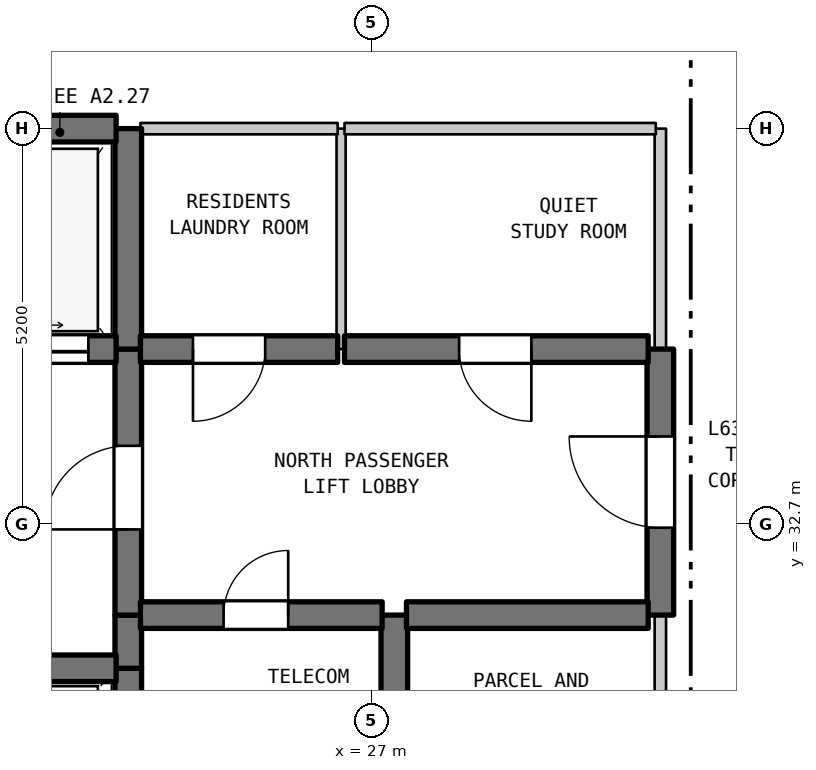
"""IFC4 building model, lengths in metres.
Left out: names, types, materials, properties, quantities, classifications, styles, units other than length and angle.
Written with IfcOpenShell. Run it as: python <this file> out.ifc"""

import sys

from ifc_helpers import new_model, si_unit, direction, frame, frame_2d, origin, place, context, subcontext, project, spatial, rectangle, extrude, element, fill, save


model = new_model("IFC4")
c1 = context("Model", 3, precision=1e-05, world=origin(), true_north=direction((0.0, 1.0)))
c2 = subcontext(c1, "Body", "Model", "MODEL_VIEW")
j1 = project(units=[si_unit("LENGTHUNIT", "METRE"), si_unit("PLANEANGLEUNIT", "RADIAN")], contexts=[c1])
p1 = place(None, origin())
s1 = spatial("IfcSite", under=j1, at=p1, CompositionType="ELEMENT")
p2 = place(p1, origin())
s2 = spatial("IfcBuilding", under=s1, at=p2, CompositionType="ELEMENT")
p3 = place(p2, frame((0.0, 0.0, 254.7)))
s3 = spatial("IfcBuildingStorey", under=s2, at=p3, CompositionType="ELEMENT", Elevation=254.7)
p4 = place(p3, frame((23.8, 28.2, 0.0), z_axis=(0.0, 0.0, 1.0), x_axis=(0.0, 1.0, 0.0)))
e1 = element("IfcWall", 1, at=p4, inside=s3, PredefinedType="SHEAR", context=c2, shape_type="SweptSolid", body=[
    extrude(rectangle(XDim=2.6, YDim=0.35, at=frame_2d((1.3, 0.0))), origin(), (0.0, 0.0, 1.0), 3.39),
])
p5 = place(p3, frame((23.8, 30.8, 0.0), z_axis=(0.0, 0.0, 1.0), x_axis=(0.0, 1.0, 0.0)))
e2 = element("IfcWall", 2, at=p5, inside=s3, PredefinedType="SHEAR", context=c2, shape_type="SweptSolid", body=[
    extrude(rectangle(XDim=0.7, YDim=0.35, at=frame_2d((0.35, 0.0))), origin(), (0.0, 0.0, 1.0), 3.39),
])
p6 = place(p3, frame((23.8, 31.5, 0.0), z_axis=(0.0, 0.0, 1.0), x_axis=(0.0, 1.0, 0.0)))
e3 = element("IfcWall", 3, at=p6, inside=s3, PredefinedType="SHEAR", context=c2, shape_type="SweptSolid", body=[
    extrude(rectangle(XDim=3.5, YDim=0.35, at=frame_2d((1.75, 0.0))), origin(), (0.0, 0.0, 1.0), 3.39),
])
p7 = place(p6, frame((1.127, 0.0, 0.0)))
e4 = element("IfcOpeningElement", 4, at=p7, cuts=e3, PredefinedType="OPENING", context=c2, shape_type="SweptSolid", body=[
    extrude(rectangle(XDim=1.1, YDim=2.15, at=frame_2d((0.55, 1.075))), frame((0.0, 0.185, 0.0), z_axis=(0.0, -1.0, 0.0), x_axis=(1.0, 0.0, 0.0)), (0.0, 0.0, 1.0), 0.37),
])
p8 = place(p3, frame((23.8, 35.0, 0.0), z_axis=(0.0, 0.0, 1.0), x_axis=(0.0, 1.0, 0.0)))
e5 = element("IfcWall", 5, at=p8, inside=s3, PredefinedType="SHEAR", context=c2, shape_type="SweptSolid", body=[
    extrude(rectangle(XDim=2.9, YDim=0.35, at=frame_2d((1.45, 0.0))), origin(), (0.0, 0.0, 1.0), 3.39),
])
p9 = place(p3, frame((26.6, 35.0, 0.0), z_axis=(0.0, 0.0, 1.0), x_axis=(0.0, 1.0, 0.0)))
e6 = element("IfcWall", 6, at=p9, inside=s3, PredefinedType="PARTITIONING", context=c2, shape_type="SweptSolid", body=[
    extrude(rectangle(XDim=2.9, YDim=0.12, at=frame_2d((1.45, 0.0))), origin(), (0.0, 0.0, 1.0), 3.39),
])
p10 = place(p3, frame((27.3, 28.9, 0.0), z_axis=(0.0, 0.0, 1.0), x_axis=(0.0, 1.0, 0.0)))
e7 = element("IfcWall", 7, at=p10, inside=s3, PredefinedType="SHEAR", context=c2, shape_type="SweptSolid", body=[
    extrude(rectangle(XDim=2.6, YDim=0.35, at=frame_2d((1.3, 0.0))), origin(), (0.0, 0.0, 1.0), 3.39),
])
p11 = place(p3, frame((30.8, 28.9, 0.0), z_axis=(0.0, 0.0, 1.0), x_axis=(0.0, 1.0, 0.0)))
e8 = element("IfcWall", 8, at=p11, inside=s3, PredefinedType="STANDARD", context=c2, shape_type="SweptSolid", body=[
    extrude(rectangle(XDim=2.6, YDim=0.15, at=frame_2d((1.3, 0.0))), origin(), (0.0, 0.0, 1.0), 3.39),
])
p12 = place(p3, frame((30.8, 31.5, 0.0), z_axis=(0.0, 0.0, 1.0), x_axis=(0.0, 1.0, 0.0)))
e9 = element("IfcWall", 9, at=p12, inside=s3, PredefinedType="SHEAR", context=c2, shape_type="SweptSolid", body=[
    extrude(rectangle(XDim=3.5, YDim=0.35, at=frame_2d((1.75, 0.0))), origin(), (0.0, 0.0, 1.0), 3.39),
])
p13 = place(p12, frame((1.15, 0.0, 0.0)))
e10 = element("IfcOpeningElement", 10, at=p13, cuts=e9, PredefinedType="OPENING", context=c2, shape_type="SweptSolid", body=[
    extrude(rectangle(XDim=1.2, YDim=2.2, at=frame_2d((0.6, 1.1))), frame((0.0, 0.185, 0.0), z_axis=(0.0, -1.0, 0.0), x_axis=(1.0, 0.0, 0.0)), (0.0, 0.0, 1.0), 0.37),
])
p14 = place(p3, frame((30.8, 35.0, 0.0), z_axis=(0.0, 0.0, 1.0), x_axis=(0.0, 1.0, 0.0)))
e11 = element("IfcWall", 11, at=p14, inside=s3, PredefinedType="STANDARD", context=c2, shape_type="SweptSolid", body=[
    extrude(rectangle(XDim=2.9, YDim=0.15, at=frame_2d((1.45, 0.0))), origin(), (0.0, 0.0, 1.0), 3.39),
])
p15 = place(p3, frame((19.16, 30.8, 0.0), z_axis=(0.0, 0.0, 1.0), x_axis=(1.0, 0.0, 0.0)))
e12 = element("IfcWall", 12, at=p15, inside=s3, PredefinedType="SHEAR", context=c2, shape_type="SweptSolid", body=[
    extrude(rectangle(XDim=4.48, YDim=0.35, at=frame_2d((2.24, 0.0))), origin(), (0.0, 0.0, 1.0), 3.39),
])
p16 = place(p3, frame((23.96, 31.5, 0.0), z_axis=(0.0, 0.0, 1.0), x_axis=(1.0, 0.0, 0.0)))
e13 = element("IfcWall", 13, at=p16, inside=s3, PredefinedType="SHEAR", context=c2, shape_type="SweptSolid", body=[
    extrude(rectangle(XDim=3.18, YDim=0.35, at=frame_2d((1.59, 0.0))), origin(), (0.0, 0.0, 1.0), 3.39),
])
p17 = place(p16, frame((1.094, 0.0, 0.0)))
e14 = element("IfcOpeningElement", 14, at=p17, cuts=e13, PredefinedType="OPENING", context=c2, shape_type="SweptSolid", body=[
    extrude(rectangle(XDim=0.85, YDim=2.1, at=frame_2d((0.425, 1.05))), frame((0.0, 0.185, 0.0), z_axis=(0.0, -1.0, 0.0), x_axis=(1.0, 0.0, 0.0)), (0.0, 0.0, 1.0), 0.37),
])
p18 = place(p3, frame((27.46, 31.5, 0.0), z_axis=(0.0, 0.0, 1.0), x_axis=(1.0, 0.0, 0.0)))
e15 = element("IfcWall", 15, at=p18, inside=s3, PredefinedType="SHEAR", context=c2, shape_type="SweptSolid", body=[
    extrude(rectangle(XDim=3.18, YDim=0.35, at=frame_2d((1.59, 0.0))), origin(), (0.0, 0.0, 1.0), 3.39),
])
p19 = place(p3, frame((19.16, 35.0, 0.0), z_axis=(0.0, 0.0, 1.0), x_axis=(1.0, 0.0, 0.0)))
e16 = element("IfcWall", 16, at=p19, inside=s3, PredefinedType="SHEAR", context=c2, shape_type="SweptSolid", body=[
    extrude(rectangle(XDim=4.48, YDim=0.35, at=frame_2d((2.24, 0.0))), origin(), (0.0, 0.0, 1.0), 3.39),
])
p20 = place(p19, frame((0.365, 0.0, 0.0)))
e17 = element("IfcOpeningElement", 17, at=p20, cuts=e16, PredefinedType="OPENING", context=c2, shape_type="SweptSolid", body=[
    extrude(rectangle(XDim=1.35, YDim=2.2, at=frame_2d((0.675, 1.1))), frame((0.0, 0.185, 0.0), z_axis=(0.0, -1.0, 0.0), x_axis=(1.0, 0.0, 0.0)), (0.0, 0.0, 1.0), 0.37),
])
p21 = place(p19, frame((2.765, 0.0, 0.0)))
e18 = element("IfcOpeningElement", 18, at=p21, cuts=e16, PredefinedType="OPENING", context=c2, shape_type="SweptSolid", body=[
    extrude(rectangle(XDim=1.35, YDim=2.2, at=frame_2d((0.675, 1.1))), frame((0.0, 0.185, 0.0), z_axis=(0.0, -1.0, 0.0), x_axis=(1.0, 0.0, 0.0)), (0.0, 0.0, 1.0), 0.37),
])
p22 = place(p3, frame((23.96, 35.0, 0.0), z_axis=(0.0, 0.0, 1.0), x_axis=(1.0, 0.0, 0.0)))
e19 = element("IfcWall", 19, at=p22, inside=s3, PredefinedType="SHEAR", context=c2, shape_type="SweptSolid", body=[
    extrude(rectangle(XDim=2.595, YDim=0.35, at=frame_2d((1.297, 0.0))), origin(), (0.0, 0.0, 1.0), 3.39),
])
p23 = place(p22, frame((0.691, 0.0, 0.0)))
e20 = element("IfcOpeningElement", 20, at=p23, cuts=e19, PredefinedType="OPENING", context=c2, shape_type="SweptSolid", body=[
    extrude(rectangle(XDim=0.95, YDim=2.15, at=frame_2d((0.475, 1.075))), frame((0.0, 0.185, 0.0), z_axis=(0.0, -1.0, 0.0), x_axis=(1.0, 0.0, 0.0)), (0.0, 0.0, 1.0), 0.37),
])
p24 = place(p3, frame((26.645, 35.0, 0.0), z_axis=(0.0, 0.0, 1.0), x_axis=(1.0, 0.0, 0.0)))
e21 = element("IfcWall", 21, at=p24, inside=s3, PredefinedType="SHEAR", context=c2, shape_type="SweptSolid", body=[
    extrude(rectangle(XDim=3.995, YDim=0.35, at=frame_2d((1.998, 0.0))), origin(), (0.0, 0.0, 1.0), 3.39),
])
p25 = place(p24, frame((1.508, 0.0, 0.0)))
e22 = element("IfcOpeningElement", 22, at=p25, cuts=e21, PredefinedType="OPENING", context=c2, shape_type="SweptSolid", body=[
    extrude(rectangle(XDim=0.95, YDim=2.15, at=frame_2d((0.475, 1.075))), frame((0.0, 0.185, 0.0), z_axis=(0.0, -1.0, 0.0), x_axis=(1.0, 0.0, 0.0)), (0.0, 0.0, 1.0), 0.37),
])
p26 = place(p3, frame((19.16, 37.9, 0.0), z_axis=(0.0, 0.0, 1.0), x_axis=(1.0, 0.0, 0.0)))
e23 = element("IfcWall", 23, at=p26, inside=s3, PredefinedType="SHEAR", context=c2, shape_type="SweptSolid", body=[
    extrude(rectangle(XDim=4.48, YDim=0.35, at=frame_2d((2.24, 0.0))), origin(), (0.0, 0.0, 1.0), 3.39),
])
p27 = place(p3, frame((23.96, 37.9, 0.0), z_axis=(0.0, 0.0, 1.0), x_axis=(1.0, 0.0, 0.0)))
e24 = element("IfcWall", 24, at=p27, inside=s3, PredefinedType="STANDARD", context=c2, shape_type="SweptSolid", body=[
    extrude(rectangle(XDim=2.595, YDim=0.15, at=frame_2d((1.297, 0.0))), origin(), (0.0, 0.0, 1.0), 2.89),
])
p28 = place(p3, frame((26.645, 37.9, 0.0), z_axis=(0.0, 0.0, 1.0), x_axis=(1.0, 0.0, 0.0)))
e25 = element("IfcWall", 25, at=p28, inside=s3, PredefinedType="STANDARD", context=c2, shape_type="SweptSolid", body=[
    extrude(rectangle(XDim=4.095, YDim=0.15, at=frame_2d((2.047, 0.0))), origin(), (0.0, 0.0, 1.0), 2.89),
])
p29 = place(p7, origin())
e26 = element("IfcDoor", 26, at=p29, inside=s3, OperationType="SINGLE_SWING_LEFT", PredefinedType="DOOR", context=c2, shape_type="SweptSolid", body=[
    extrude(rectangle(XDim=1.1, YDim=2.15, at=frame_2d((0.55, 1.075))), frame((0.0, 0.025, 0.0), z_axis=(0.0, -1.0, 0.0), x_axis=(1.0, 0.0, 0.0)), (0.0, 0.0, 1.0), 0.05),
])
fill(e4, e26)
p30 = place(p13, origin())
e27 = element("IfcDoor", 27, at=p30, inside=s3, OperationType="SINGLE_SWING_RIGHT", PredefinedType="DOOR", context=c2, shape_type="SweptSolid", body=[
    extrude(rectangle(XDim=1.2, YDim=2.2, at=frame_2d((0.6, 1.1))), frame((0.0, 0.025, 0.0), z_axis=(0.0, -1.0, 0.0), x_axis=(1.0, 0.0, 0.0)), (0.0, 0.0, 1.0), 0.05),
])
fill(e10, e27)
p31 = place(p17, origin())
e28 = element("IfcDoor", 28, at=p31, inside=s3, OperationType="SINGLE_SWING_RIGHT", PredefinedType="DOOR", context=c2, shape_type="SweptSolid", body=[
    extrude(rectangle(XDim=0.85, YDim=2.1, at=frame_2d((0.425, 1.05))), frame((0.0, 0.025, 0.0), z_axis=(0.0, -1.0, 0.0), x_axis=(1.0, 0.0, 0.0)), (0.0, 0.0, 1.0), 0.05),
])
fill(e14, e28)
p32 = place(p21, origin())
e29 = element("IfcDoor", 29, at=p32, inside=s3, OperationType="DOUBLE_DOOR_SLIDING", PredefinedType="DOOR", context=c2, shape_type="SweptSolid", body=[
    extrude(rectangle(XDim=1.35, YDim=2.2, at=frame_2d((0.675, 1.1))), frame((0.0, 0.025, 0.0), z_axis=(0.0, -1.0, 0.0), x_axis=(1.0, 0.0, 0.0)), (0.0, 0.0, 1.0), 0.05),
])
fill(e18, e29)
p33 = place(p23, frame((0.95, 0.0, 0.0), z_axis=(0.0, 0.0, 1.0), x_axis=(-1.0, 0.0, 0.0)))
e30 = element("IfcDoor", 30, at=p33, inside=s3, OperationType="SINGLE_SWING_LEFT", PredefinedType="DOOR", context=c2, shape_type="SweptSolid", body=[
    extrude(rectangle(XDim=0.95, YDim=2.15, at=frame_2d((0.475, 1.075))), frame((0.0, 0.025, 0.0), z_axis=(0.0, -1.0, 0.0), x_axis=(1.0, 0.0, 0.0)), (0.0, 0.0, 1.0), 0.05),
])
fill(e20, e30)
p34 = place(p25, frame((0.95, 0.0, 0.0), z_axis=(0.0, 0.0, 1.0), x_axis=(-1.0, 0.0, 0.0)))
e31 = element("IfcDoor", 31, at=p34, inside=s3, OperationType="SINGLE_SWING_RIGHT", PredefinedType="DOOR", context=c2, shape_type="SweptSolid", body=[
    extrude(rectangle(XDim=0.95, YDim=2.15, at=frame_2d((0.475, 1.075))), frame((0.0, 0.025, 0.0), z_axis=(0.0, -1.0, 0.0), x_axis=(1.0, 0.0, 0.0)), (0.0, 0.0, 1.0), 0.05),
])
fill(e22, e31)
save(model, sys.argv[1])
